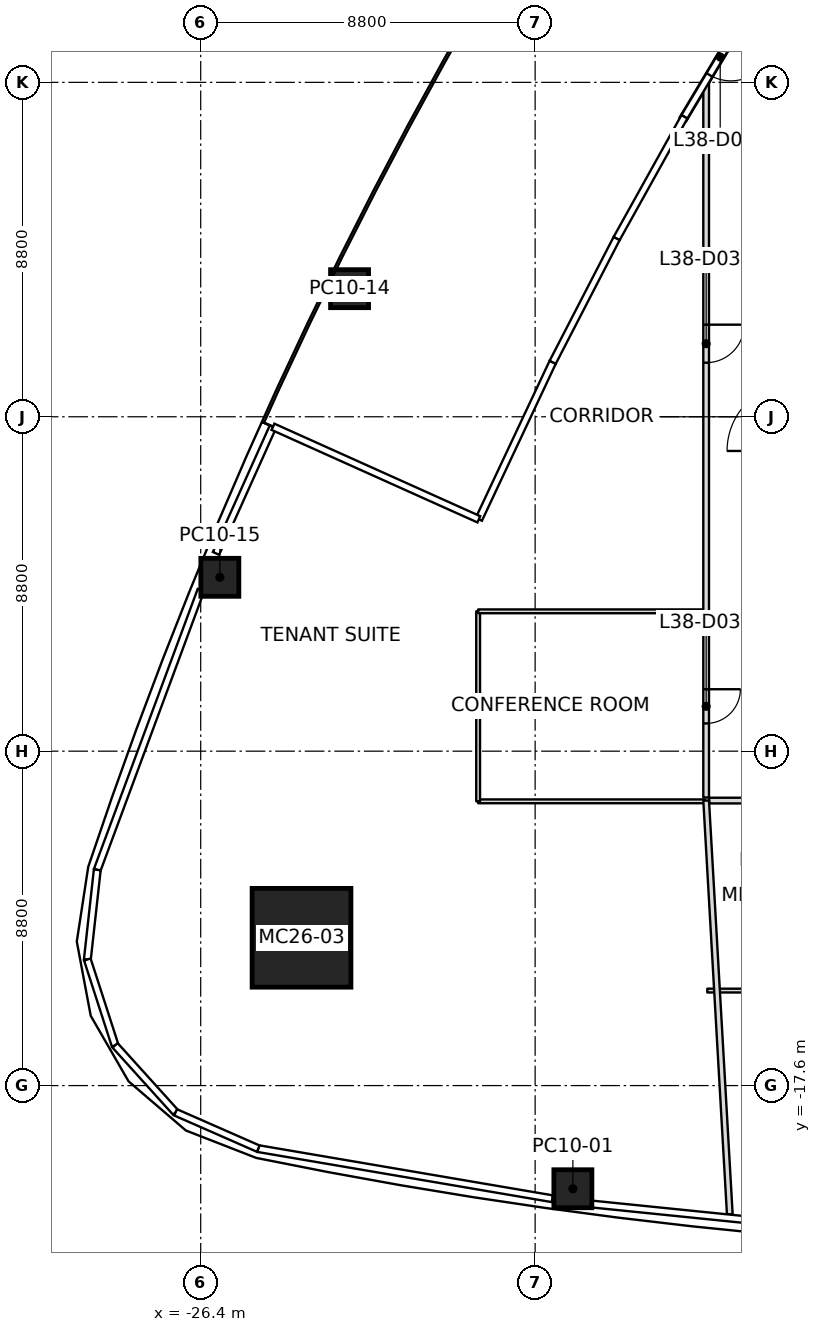
"""IFC4 building model, lengths in metres.
Left out: names, types, materials, properties, quantities, classifications, styles, units other than length and angle.
Written with IfcOpenShell. Run it as: python <this file> out.ifc"""

import sys

from ifc_helpers import new_model, si_unit, direction, frame, frame_2d, origin, origin_2d, place, context, subcontext, project, spatial, rectangle, extrude, element, fill, save


model = new_model("IFC4")
c1 = context("Model", 3, precision=1e-05, world=origin(), true_north=direction((0.0, 1.0)))
c2 = subcontext(c1, "Body", "Model", "MODEL_VIEW")
j1 = project(units=[si_unit("LENGTHUNIT", "METRE"), si_unit("PLANEANGLEUNIT", "RADIAN")], contexts=[c1])
p1 = place(None, origin())
s1 = spatial("IfcSite", under=j1, at=p1, CompositionType="ELEMENT")
p2 = place(p1, origin())
s2 = spatial("IfcBuilding", under=s1, at=p2, CompositionType="ELEMENT")
p3 = place(p2, frame((0.0, 0.0, 173.8)))
s3 = spatial("IfcBuildingStorey", under=s2, at=p3, CompositionType="ELEMENT", Elevation=173.8)
p4 = place(p3, frame((-23.747, -13.71, 0.0), z_axis=(0.028061445165, 0.016165832541, 0.999475473012), x_axis=(0.999606200108, -0.000453815336, -0.028057775329)))
e1 = element("IfcColumn", 1, at=p4, inside=s3, PredefinedType="COLUMN", context=c2, shape_type="SweptSolid", body=[
    extrude(rectangle(XDim=2.6, YDim=2.6, at=origin_2d()), origin(), (0.0, 0.0, 1.0), 4.002),
])
p5 = place(p3, frame((-16.607, -20.315, 0.0), z_axis=(0.017635445209, 0.010495835903, 0.999789392073), x_axis=(-0.990749179491, 0.134751980864, 0.01606135084)))
e2 = element("IfcColumn", 2, at=p5, inside=s3, PredefinedType="COLUMN", context=c2, shape_type="SweptSolid", body=[
    extrude(rectangle(XDim=1.0, YDim=1.0, at=origin_2d()), origin(), (0.0, 0.0, 1.0), 4.001),
])
p6 = place(p3, frame((-22.483, 3.371, 0.0), z_axis=(0.014097689605, 0.002074984617, 0.999898469639), x_axis=(0.440410985466, 0.897759990015, -0.008072435138)))
e3 = element("IfcColumn", 3, at=p6, inside=s3, PredefinedType="COLUMN", context=c2, shape_type="SweptSolid", body=[
    extrude(rectangle(XDim=1.0, YDim=1.0, at=origin_2d()), origin(), (0.0, 0.0, 1.0), 4.0),
])
p7 = place(p3, frame((-25.896, -4.225, 0.0), z_axis=(0.017879535448, 0.010068680372, 0.999789449778), x_axis=(0.378844878394, 0.925320242146, -0.016093712727)))
e4 = element("IfcColumn", 4, at=p7, inside=s3, PredefinedType="COLUMN", context=c2, shape_type="SweptSolid", body=[
    extrude(rectangle(XDim=1.0, YDim=1.0, at=origin_2d()), origin(), (0.0, 0.0, 1.0), 4.001),
])
p8 = place(p3, frame((-11.742, 11.118, 0.0), z_axis=(0.0, 0.0, 1.0), x_axis=(-0.513422332631, -0.858136066341, 0.0)))
e5 = element("IfcWall", 5, at=p8, inside=s3, PredefinedType="SOLIDWALL", context=c2, shape_type="SweptSolid", body=[
    extrude(rectangle(XDim=3.848, YDim=0.2, at=frame_2d((1.924, 0.0))), origin(), (0.0, 0.0, 1.0), 3.34),
])
p9 = place(p8, frame((1.374, 0.0, 0.0)))
e6 = element("IfcOpeningElement", 6, at=p9, cuts=e5, PredefinedType="OPENING", context=c2, shape_type="SweptSolid", body=[
    extrude(rectangle(XDim=1.1, YDim=2.1, at=frame_2d((0.55, 1.05))), frame((0.0, 0.1, 0.0), z_axis=(0.0, -1.0, 0.0), x_axis=(1.0, 0.0, 0.0)), (0.0, 0.0, 1.0), 0.2),
])
p10 = place(p3, frame((-13.1, -10.1, 0.0), z_axis=(0.0, 0.0, 1.0), x_axis=(0.057075935192, -0.9983698401, 0.0)))
e7 = element("IfcWall", 7, at=p10, inside=s3, PredefinedType="PARTITIONING", context=c2, shape_type="SweptSolid", body=[
    extrude(rectangle(XDim=10.903, YDim=0.15, at=frame_2d((5.452, 0.0))), origin(), (0.0, 0.0, 1.0), 3.234),
])
p11 = place(p3, frame((-13.1, 8.866, 0.0), z_axis=(0.0, 0.0, 1.0), x_axis=(0.0, -1.0, 0.0)))
e8 = element("IfcWall", 8, at=p11, inside=s3, PredefinedType="PARTITIONING", context=c2, shape_type="SweptSolid", body=[
    extrude(rectangle(XDim=18.886, YDim=0.15, at=frame_2d((9.443, 0.0))), origin(), (0.0, 0.0, 1.0), 3.166),
])
p12 = place(p11, frame((16.037, 0.0, 0.0)))
e9 = element("IfcOpeningElement", 9, at=p12, cuts=e8, PredefinedType="OPENING", context=c2, shape_type="SweptSolid", body=[
    extrude(rectangle(XDim=0.9, YDim=2.1, at=frame_2d((0.45, 1.05))), frame((0.0, 0.075, 0.0), z_axis=(0.0, -1.0, 0.0), x_axis=(1.0, 0.0, 0.0)), (0.0, 0.0, 1.0), 0.15),
])
p13 = place(p11, frame((6.443, 0.0, 0.0)))
e10 = element("IfcOpeningElement", 10, at=p13, cuts=e8, PredefinedType="OPENING", context=c2, shape_type="SweptSolid", body=[
    extrude(rectangle(XDim=1.0, YDim=2.1, at=frame_2d((0.5, 1.05))), frame((0.0, 0.075, 0.0), z_axis=(0.0, -1.0, 0.0), x_axis=(1.0, 0.0, 0.0)), (0.0, 0.0, 1.0), 0.15),
])
p14 = place(p3, frame((-13.02, -10.1, 0.0), z_axis=(0.0, 0.0, 1.0), x_axis=(1.0, 0.0, 0.0)))
e11 = element("IfcWall", 11, at=p14, inside=s3, PredefinedType="PARTITIONING", context=c2, shape_type="SweptSolid", body=[
    extrude(rectangle(XDim=26.04, YDim=0.15, at=frame_2d((13.02, 0.0))), origin(), (0.0, 0.0, 1.0), 3.317),
])
p15 = place(p14, frame((1.57, 0.0, 0.0)))
e12 = element("IfcOpeningElement", 12, at=p15, cuts=e11, PredefinedType="OPENING", context=c2, shape_type="SweptSolid", body=[
    extrude(rectangle(XDim=0.9, YDim=2.1, at=frame_2d((0.45, 1.05))), frame((0.0, 0.075, 0.0), z_axis=(0.0, -1.0, 0.0), x_axis=(1.0, 0.0, 0.0)), (0.0, 0.0, 1.0), 0.15),
])
p16 = place(p14, frame((8.42, 0.0, 0.0)))
e13 = element("IfcOpeningElement", 13, at=p16, cuts=e11, PredefinedType="OPENING", context=c2, shape_type="SweptSolid", body=[
    extrude(rectangle(XDim=1.0, YDim=2.1, at=frame_2d((0.5, 1.05))), frame((0.0, 0.075, 0.0), z_axis=(0.0, -1.0, 0.0), x_axis=(1.0, 0.0, 0.0)), (0.0, 0.0, 1.0), 0.15),
])
p17 = place(p14, frame((14.97, 0.0, 0.0)))
e14 = element("IfcOpeningElement", 14, at=p17, cuts=e11, PredefinedType="OPENING", context=c2, shape_type="SweptSolid", body=[
    extrude(rectangle(XDim=0.9, YDim=2.1, at=frame_2d((0.45, 1.05))), frame((0.0, 0.075, 0.0), z_axis=(0.0, -1.0, 0.0), x_axis=(1.0, 0.0, 0.0)), (0.0, 0.0, 1.0), 0.15),
])
p18 = place(p14, frame((21.22, 0.0, 0.0)))
e15 = element("IfcOpeningElement", 15, at=p18, cuts=e11, PredefinedType="OPENING", context=c2, shape_type="SweptSolid", body=[
    extrude(rectangle(XDim=1.0, YDim=2.1, at=frame_2d((0.5, 1.05))), frame((0.0, 0.075, 0.0), z_axis=(0.0, -1.0, 0.0), x_axis=(1.0, 0.0, 0.0)), (0.0, 0.0, 1.0), 0.15),
])
p19 = place(p3, frame((-13.13, -10.12, 0.0), z_axis=(0.0, 0.0, 1.0), x_axis=(-1.0, 0.0, 0.0)))
e16 = element("IfcWall", 16, at=p19, inside=s3, PredefinedType="PARTITIONING", context=c2, shape_type="SweptSolid", body=[
    extrude(rectangle(XDim=5.97, YDim=0.1, at=frame_2d((2.985, 0.0))), origin(), (0.0, 0.0, 1.0), 3.166),
])
p20 = place(p3, frame((-19.1, -10.12, 0.0), z_axis=(0.0, 0.0, 1.0), x_axis=(0.0, 1.0, 0.0)))
e17 = element("IfcWall", 17, at=p20, inside=s3, PredefinedType="PARTITIONING", context=c2, shape_type="SweptSolid", body=[
    extrude(rectangle(XDim=5.0, YDim=0.1, at=frame_2d((2.5, 0.0))), origin(), (0.0, 0.0, 1.0), 3.45),
])
p21 = place(p3, frame((-19.1, -5.12, 0.0), z_axis=(0.0, 0.0, 1.0), x_axis=(1.0, 0.0, 0.0)))
e18 = element("IfcWall", 18, at=p21, inside=s3, PredefinedType="PARTITIONING", context=c2, shape_type="SweptSolid", body=[
    extrude(rectangle(XDim=5.97, YDim=0.1, at=frame_2d((2.985, 0.0))), origin(), (0.0, 0.0, 1.0), 3.247),
])
p22 = place(p3, frame((-8.9, -15.1, 0.0), z_axis=(0.0, 0.0, 1.0), x_axis=(-1.0, 0.0, 0.0)))
e19 = element("IfcWall", 19, at=p22, inside=s3, PredefinedType="PARTITIONING", context=c2, shape_type="SweptSolid", body=[
    extrude(rectangle(XDim=4.17, YDim=0.1, at=frame_2d((2.085, 0.0))), origin(), (0.0, 0.0, 1.0), 3.317),
])
p23 = place(p9, origin())
e20 = element("IfcDoor", 20, at=p23, inside=s3, OperationType="SINGLE_SWING_LEFT", PredefinedType="DOOR", context=c2, shape_type="SweptSolid", body=[
    extrude(rectangle(XDim=1.1, YDim=2.1, at=frame_2d((0.55, 1.05))), frame((0.0, 0.025, 0.0), z_axis=(0.0, -1.0, 0.0), x_axis=(1.0, 0.0, 0.0)), (0.0, 0.0, 1.0), 0.05),
])
fill(e6, e20)
p24 = place(p12, origin())
e21 = element("IfcDoor", 21, at=p24, inside=s3, OperationType="SINGLE_SWING_LEFT", PredefinedType="DOOR", context=c2, shape_type="SweptSolid", body=[
    extrude(rectangle(XDim=0.9, YDim=2.1, at=frame_2d((0.45, 1.05))), frame((0.0, 0.025, 0.0), z_axis=(0.0, -1.0, 0.0), x_axis=(1.0, 0.0, 0.0)), (0.0, 0.0, 1.0), 0.05),
])
fill(e9, e21)
p25 = place(p13, origin())
e22 = element("IfcDoor", 22, at=p25, inside=s3, OperationType="SINGLE_SWING_LEFT", PredefinedType="DOOR", context=c2, shape_type="SweptSolid", body=[
    extrude(rectangle(XDim=1.0, YDim=2.1, at=frame_2d((0.5, 1.05))), frame((0.0, 0.025, 0.0), z_axis=(0.0, -1.0, 0.0), x_axis=(1.0, 0.0, 0.0)), (0.0, 0.0, 1.0), 0.05),
])
fill(e10, e22)
save(model, sys.argv[1])
